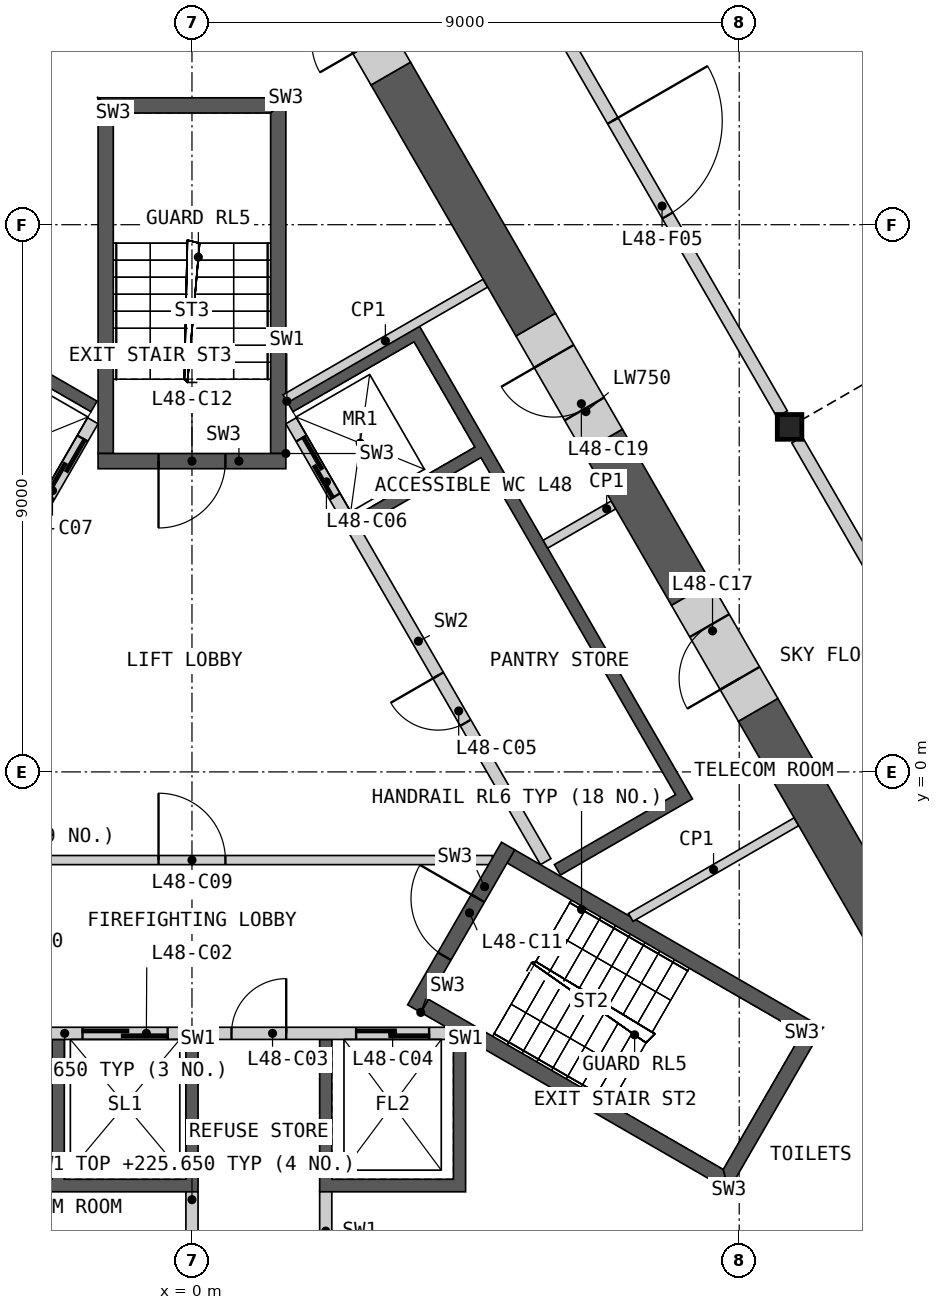
"""IFC4 building model, lengths in metres.
Left out: names, types, materials, properties, quantities, classifications, styles, units other than length and angle.
Written with IfcOpenShell. Run it as: python <this file> out.ifc"""

import sys

from ifc_helpers import new_model, si_unit, direction, frame, frame_2d, origin, origin_2d, place, context, subcontext, project, spatial, polyline, rectangle, i_section, outline, extrude, element, fill, save


model = new_model("IFC4")
c1 = context("Model", 3, precision=1e-05, world=origin(), true_north=direction((0.0, 1.0)))
c2 = subcontext(c1, "Body", "Model", "MODEL_VIEW")
j1 = project(units=[si_unit("LENGTHUNIT", "METRE"), si_unit("PLANEANGLEUNIT", "RADIAN")], contexts=[c1])
p1 = place(None, origin())
s1 = spatial("IfcSite", under=j1, at=p1, CompositionType="ELEMENT")
p2 = place(p1, origin())
s2 = spatial("IfcBuilding", under=s1, at=p2, CompositionType="ELEMENT")
p3 = place(p2, frame((0.0, 0.0, 216.0)))
s3 = spatial("IfcBuildingStorey", under=s2, at=p3, CompositionType="ELEMENT", Elevation=216.0)
p4 = place(p3, frame((9.828, 5.675, 0.0), z_axis=(0.0, 0.0, 1.0), x_axis=(1.0, 0.0, 0.0)))
e1 = element("IfcColumn", 1, at=p4, inside=s3, PredefinedType="COLUMN", context=c2, shape_type="SweptSolid", body=[
    extrude(i_section(OverallWidth=0.404, OverallDepth=0.407, WebThickness=0.027, FlangeThickness=0.044, at=origin_2d()), origin(), (0.0, 0.0, 1.0), 10.0),
])
p5 = place(p3, origin())
e2 = element("IfcWall", 2, at=p5, inside=s3, PredefinedType="SHEAR", context=c2, shape_type="SweptSolid", body=[
    extrude(outline(polyline([(4.5, -4.4), (4.5, -6.906), (2.1, -6.906), (2.1, -4.4), (2.3, -4.4), (2.3, -6.7), (4.3, -6.7), (4.3, -4.4), (4.5, -4.4)])), origin(), (0.0, 0.0, 1.0), 9.65),
])
p6 = place(p3, origin())
e3 = element("IfcWall", 3, at=p6, inside=s3, PredefinedType="SHEAR", context=c2, shape_type="SweptSolid", body=[
    extrude(outline(polyline([(0.1, -4.4), (0.1, -6.906), (-4.5, -6.906), (-4.5, -4.4), (-4.3, -4.4), (-4.3, -6.7), (-2.3, -6.7), (-2.3, -4.4), (-2.1, -4.4), (-2.1, -6.7), (-0.1, -6.7), (-0.1, -4.4), (0.1, -4.4)])), origin(), (0.0, 0.0, 1.0), 9.65),
])
p7 = place(p3, frame((-4.187, -4.3, 0.0), z_axis=(0.0, 0.0, 1.0), x_axis=(1.0, 0.0, 0.0)))
e4 = element("IfcWall", 4, at=p7, inside=s3, PredefinedType="SOLIDWALL", context=c2, shape_type="SweptSolid", body=[
    extrude(rectangle(XDim=8.373, YDim=0.2, at=frame_2d((4.187, 0.0))), origin(), (0.0, 0.0, 1.0), 9.65),
])
p8 = place(p7, frame((0.287, 0.0, 0.0)))
e5 = element("IfcOpeningElement", 5, at=p8, cuts=e4, PredefinedType="OPENING", context=c2, shape_type="SweptSolid", body=[
    extrude(rectangle(XDim=1.2, YDim=2.1, at=frame_2d((0.6, 1.05))), frame((0.0, 0.11, 0.0), z_axis=(0.0, -1.0, 0.0), x_axis=(1.0, 0.0, 0.0)), (0.0, 0.0, 1.0), 0.22),
])
p9 = place(p7, frame((2.387, 0.0, 0.0)))
e6 = element("IfcOpeningElement", 6, at=p9, cuts=e4, PredefinedType="OPENING", context=c2, shape_type="SweptSolid", body=[
    extrude(rectangle(XDim=1.4, YDim=2.1, at=frame_2d((0.7, 1.05))), frame((0.0, 0.11, 0.0), z_axis=(0.0, -1.0, 0.0), x_axis=(1.0, 0.0, 0.0)), (0.0, 0.0, 1.0), 0.22),
])
p10 = place(p7, frame((4.837, 0.0, 0.0)))
e7 = element("IfcOpeningElement", 7, at=p10, cuts=e4, PredefinedType="OPENING", context=c2, shape_type="SweptSolid", body=[
    extrude(rectangle(XDim=0.9, YDim=2.1, at=frame_2d((0.45, 1.05))), frame((0.0, 0.11, 0.0), z_axis=(0.0, -1.0, 0.0), x_axis=(1.0, 0.0, 0.0)), (0.0, 0.0, 1.0), 0.22),
])
p11 = place(p7, frame((6.887, 0.0, 0.0)))
e8 = element("IfcOpeningElement", 8, at=p11, cuts=e4, PredefinedType="OPENING", context=c2, shape_type="SweptSolid", body=[
    extrude(rectangle(XDim=1.2, YDim=2.1, at=frame_2d((0.6, 1.05))), frame((0.0, 0.11, 0.0), z_axis=(0.0, -1.0, 0.0), x_axis=(1.0, 0.0, 0.0)), (0.0, 0.0, 1.0), 0.22),
])
for number, where, z_axis, x_axis in (
    (9, (0.0, -6.906, 0.0), (0.0, 0.0, 1.0), (0.0, -1.0, 0.0)),
    (10, (2.2, -6.906, 0.0), (0.0, 0.0, 1.0), (0.0, -1.0, 0.0)),
):
    element("IfcWall", number, at=place(p3, frame(where, z_axis=z_axis, x_axis=x_axis)), inside=s3, PredefinedType="SHEAR", context=c2, shape_type="SweptSolid", body=[
        extrude(rectangle(XDim=1.293, YDim=0.2, at=frame_2d((0.646, 0.0))), origin(), (0.0, 0.0, 1.0), 9.65),
    ])
p12 = place(p3, origin())
e11 = element("IfcWall", 11, at=p12, inside=s3, PredefinedType="SHEAR", context=c2, shape_type="SweptSolid", body=[
    extrude(outline(polyline([(1.561, 6.097), (3.731, 7.35), (8.231, -0.444), (6.061, -1.697), (5.96, -1.524), (7.952, -0.374), (4.752, 5.169), (2.76, 4.019), (2.66, 4.192), (4.652, 5.342), (3.652, 7.074), (1.66, 5.924), (1.561, 6.097)])), origin(), (0.0, 0.0, 1.0), 9.65),
])
p13 = place(p3, frame((5.817, -1.476, 0.0), z_axis=(0.0, 0.0, 1.0), x_axis=(-0.500002616675, 0.866023893041, 0.0)))
e12 = element("IfcWall", 12, at=p13, inside=s3, PredefinedType="SOLIDWALL", context=c2, shape_type="SweptSolid", body=[
    extrude(rectangle(XDim=8.373, YDim=0.2, at=frame_2d((4.187, 0.0))), origin(), (0.0, 0.0, 1.0), 9.65),
])
p14 = place(p13, frame((2.637, 0.0, 0.0)))
e13 = element("IfcOpeningElement", 13, at=p14, cuts=e12, PredefinedType="OPENING", context=c2, shape_type="SweptSolid", body=[
    extrude(rectangle(XDim=0.9, YDim=2.1, at=frame_2d((0.45, 1.05))), frame((0.0, 0.11, 0.0), z_axis=(0.0, -1.0, 0.0), x_axis=(1.0, 0.0, 0.0)), (0.0, 0.0, 1.0), 0.22),
])
p15 = place(p13, frame((6.937, 0.0, 0.0)))
e14 = element("IfcOpeningElement", 14, at=p15, cuts=e12, PredefinedType="OPENING", context=c2, shape_type="SweptSolid", body=[
    extrude(rectangle(XDim=1.1, YDim=2.1, at=frame_2d((0.55, 1.05))), frame((0.0, 0.11, 0.0), z_axis=(0.0, -1.0, 0.0), x_axis=(1.0, 0.0, 0.0)), (0.0, 0.0, 1.0), 0.22),
])
p16 = place(p3, origin())
e15 = element("IfcWall", 15, at=p16, inside=s3, PredefinedType="SHEAR", context=c2, shape_type="SweptSolid", body=[
    extrude(outline(polyline([(-4.96, 0.208), (-7.131, 1.461), (-3.731, 7.35), (-1.561, 6.097), (-1.66, 5.924), (-3.652, 7.074), (-4.652, 5.342), (-2.66, 4.192), (-2.76, 4.019), (-4.752, 5.169), (-5.752, 3.437), (-3.76, 2.287), (-3.861, 2.113), (-5.852, 3.263), (-6.852, 1.531), (-4.861, 0.381), (-4.96, 0.208)])), origin(), (0.0, 0.0, 1.0), 9.65),
])
p17 = place(p3, frame((-1.631, 5.776, 0.0), z_axis=(0.0, 0.0, 1.0), x_axis=(-0.499992876559, -0.866029516466, 0.0)))
e16 = element("IfcWall", 16, at=p17, inside=s3, PredefinedType="SOLIDWALL", context=c2, shape_type="SweptSolid", body=[
    extrude(rectangle(XDim=6.486, YDim=0.2, at=frame_2d((3.243, 0.0))), origin(), (0.0, 0.0, 1.0), 9.65),
])
p18 = place(p17, frame((0.337, 0.0, 0.0)))
e17 = element("IfcOpeningElement", 17, at=p18, cuts=e16, PredefinedType="OPENING", context=c2, shape_type="SweptSolid", body=[
    extrude(rectangle(XDim=1.1, YDim=2.1, at=frame_2d((0.55, 1.05))), frame((0.0, 0.11, 0.0), z_axis=(0.0, -1.0, 0.0), x_axis=(1.0, 0.0, 0.0)), (0.0, 0.0, 1.0), 0.22),
])
p19 = place(p17, frame((2.537, 0.0, 0.0)))
e18 = element("IfcOpeningElement", 18, at=p19, cuts=e16, PredefinedType="OPENING", context=c2, shape_type="SweptSolid", body=[
    extrude(rectangle(XDim=1.1, YDim=2.1, at=frame_2d((0.55, 1.05))), frame((0.0, 0.11, 0.0), z_axis=(0.0, -1.0, 0.0), x_axis=(1.0, 0.0, 0.0)), (0.0, 0.0, 1.0), 0.22),
])
p20 = place(p3, frame((-4.941, -1.45, 0.0), z_axis=(0.0, 0.0, 1.0), x_axis=(1.0, 0.0, 0.0)))
e19 = element("IfcWall", 19, at=p20, inside=s3, PredefinedType="PARTITIONING", context=c2, shape_type="SweptSolid", body=[
    extrude(rectangle(XDim=9.882, YDim=0.15, at=frame_2d((4.941, 0.0))), origin(), (0.0, 0.0, 1.0), 9.65),
])
p21 = place(p20, frame((4.391, 0.0, 0.0)))
e20 = element("IfcOpeningElement", 20, at=p21, cuts=e19, PredefinedType="OPENING", context=c2, shape_type="SweptSolid", body=[
    extrude(rectangle(XDim=1.1, YDim=2.1, at=frame_2d((0.55, 1.05))), frame((0.0, 0.085, 0.0), z_axis=(0.0, -1.0, 0.0), x_axis=(1.0, 0.0, 0.0)), (0.0, 0.0, 1.0), 0.17),
])
p22 = place(p3, origin())
e21 = element("IfcWall", 21, at=p22, inside=s3, PredefinedType="SHEAR", context=c2, shape_type="SweptSolid", body=[
    extrude(outline(polyline([(3.763, -3.956), (8.83, -6.881), (8.738, -6.539), (3.888, -3.739), (3.763, -3.956)])), origin(), (0.0, 0.0, 1.0), 9.65),
])
p23 = place(p3, origin())
e22 = element("IfcWall", 22, at=p23, inside=s3, PredefinedType="SHEAR", context=c2, shape_type="SweptSolid", body=[
    extrude(outline(polyline([(8.83, -6.881), (10.374, -4.206), (10.032, -4.298), (8.738, -6.539), (8.83, -6.881)])), origin(), (0.0, 0.0, 1.0), 9.65),
])
p24 = place(p3, origin())
e23 = element("IfcWall", 23, at=p24, inside=s3, PredefinedType="SHEAR", context=c2, shape_type="SweptSolid", body=[
    extrude(outline(polyline([(10.032, -4.298), (10.374, -4.206), (5.307, -1.281), (5.182, -1.498), (10.032, -4.298)])), origin(), (0.0, 0.0, 1.0), 9.65),
])
p25 = place(p3, frame((3.655, -3.893, 0.0), z_axis=(0.0, 0.0, 1.0), x_axis=(0.499982516597, 0.866035497597, 0.0)))
e24 = element("IfcWall", 24, at=p25, inside=s3, PredefinedType="SHEAR", context=c2, shape_type="SweptSolid", body=[
    extrude(rectangle(XDim=3.088, YDim=0.25, at=frame_2d((1.544, 0.0))), origin(), (0.0, 0.0, 1.0), 9.65),
])
p26 = place(p25, frame((0.994, 0.0, 0.0)))
e25 = element("IfcOpeningElement", 25, at=p26, cuts=e24, PredefinedType="OPENING", context=c2, shape_type="SweptSolid", body=[
    extrude(rectangle(XDim=1.1, YDim=2.1, at=frame_2d((0.55, 1.05))), frame((0.0, 0.135, 0.0), z_axis=(0.0, -1.0, 0.0), x_axis=(1.0, 0.0, 0.0)), (0.0, 0.0, 1.0), 0.27),
])
p27 = place(p3, origin())
e26 = element("IfcWall", 26, at=p27, inside=s3, PredefinedType="SHEAR", context=c2, shape_type="SweptSolid", body=[
    extrude(outline(polyline([(1.544, 5.237), (1.544, 11.087), (1.294, 10.837), (1.294, 5.237), (1.544, 5.237)])), origin(), (0.0, 0.0, 1.0), 9.65),
])
p28 = place(p3, origin())
e27 = element("IfcWall", 27, at=p28, inside=s3, PredefinedType="SHEAR", context=c2, shape_type="SweptSolid", body=[
    extrude(outline(polyline([(1.544, 11.087), (-1.544, 11.087), (-1.294, 10.837), (1.294, 10.837), (1.544, 11.087)])), origin(), (0.0, 0.0, 1.0), 9.65),
])
p29 = place(p3, origin())
e28 = element("IfcWall", 28, at=p29, inside=s3, PredefinedType="SHEAR", context=c2, shape_type="SweptSolid", body=[
    extrude(outline(polyline([(-1.294, 10.837), (-1.544, 11.087), (-1.544, 5.237), (-1.294, 5.237), (-1.294, 10.837)])), origin(), (0.0, 0.0, 1.0), 9.65),
])
p30 = place(p3, frame((1.544, 5.112, 0.0), z_axis=(0.0, 0.0, 1.0), x_axis=(-1.0, 0.0, 0.0)))
e29 = element("IfcWall", 29, at=p30, inside=s3, PredefinedType="SHEAR", context=c2, shape_type="SweptSolid", body=[
    extrude(rectangle(XDim=3.088, YDim=0.25, at=frame_2d((1.544, 0.0))), origin(), (0.0, 0.0, 1.0), 9.65),
])
p31 = place(p30, frame((0.994, 0.0, 0.0)))
e30 = element("IfcOpeningElement", 30, at=p31, cuts=e29, PredefinedType="OPENING", context=c2, shape_type="SweptSolid", body=[
    extrude(rectangle(XDim=1.1, YDim=2.1, at=frame_2d((0.55, 1.05))), frame((0.0, 0.135, 0.0), z_axis=(0.0, -1.0, 0.0), x_axis=(1.0, 0.0, 0.0)), (0.0, 0.0, 1.0), 0.27),
])
p32 = place(p3, frame((9.941, -0.82, 0.0), z_axis=(0.0, 0.0, 1.0), x_axis=(-0.866018897435, -0.500011269158, 0.0)))
e31 = element("IfcWall", 31, at=p32, inside=s3, PredefinedType="PARTITIONING", context=c2, shape_type="SweptSolid", body=[
    extrude(rectangle(XDim=3.146, YDim=0.15, at=frame_2d((1.573, 0.0))), origin(), (0.0, 0.0, 1.0), 9.65),
])
p33 = place(p3, frame((6.932, 4.391, 0.0), z_axis=(0.0, 0.0, 1.0), x_axis=(-0.866003189247, -0.500038474733, 0.0)))
e32 = element("IfcWall", 32, at=p33, inside=s3, PredefinedType="PARTITIONING", context=c2, shape_type="SweptSolid", body=[
    extrude(rectangle(XDim=1.293, YDim=0.15, at=frame_2d((0.646, 0.0))), origin(), (0.0, 0.0, 1.0), 9.65),
])
p34 = place(p3, frame((4.826, 8.039, 0.0), z_axis=(0.0, 0.0, 1.0), x_axis=(-0.86601654697, -0.500015340139, 0.0)))
e33 = element("IfcWall", 33, at=p34, inside=s3, PredefinedType="PARTITIONING", context=c2, shape_type="SweptSolid", body=[
    extrude(rectangle(XDim=3.8, YDim=0.15, at=frame_2d((1.9, 0.0))), origin(), (0.0, 0.0, 1.0), 9.65),
])
p35 = place(p3, frame((14.526, -8.011, 0.0), z_axis=(0.0, 0.0, 1.0), x_axis=(-0.499981157383, 0.866036282301, 0.0)))
e34 = element("IfcWall", 34, at=p35, inside=s3, PredefinedType="SHEAR", context=c2, shape_type="SweptSolid", body=[
    extrude(rectangle(XDim=10.429, YDim=0.75, at=frame_2d((5.215, 0.0))), origin(), (0.0, 0.0, 1.0), 9.65),
])
p36 = place(p3, frame((5.654, 7.355, 0.0), z_axis=(0.0, 0.0, 1.0), x_axis=(-0.4999705729, 0.866042392862, 0.0)))
e35 = element("IfcWall", 35, at=p36, inside=s3, PredefinedType="SHEAR", context=c2, shape_type="SweptSolid", body=[
    extrude(rectangle(XDim=4.77, YDim=0.75, at=frame_2d((2.385, 0.0))), origin(), (0.0, 0.0, 1.0), 9.65),
])
p37 = place(p3, frame((8.211, 2.926, 0.0), z_axis=(0.0, 0.0, 1.0), x_axis=(-0.500022172694, 0.866012601995, 0.0)))
e36 = element("IfcWall", 36, at=p37, inside=s3, PredefinedType="SHEAR", context=c2, shape_type="SweptSolid", body=[
    extrude(rectangle(XDim=2.914, YDim=0.75, at=frame_2d((1.457, 0.0))), origin(), (0.0, 0.0, 1.0), 9.65),
])
p38 = place(p3, frame((-0.325, 16.585, 0.0), z_axis=(0.0, 0.0, 1.0), x_axis=(-0.500008939514, -0.866020242492, 0.0)))
e37 = element("IfcWall", 37, at=p38, inside=s3, PredefinedType="SHEAR", context=c2, shape_type="SweptSolid", body=[
    extrude(rectangle(XDim=11.901, YDim=0.75, at=frame_2d((5.951, 0.0))), origin(), (0.0, 0.0, 1.0), 9.65),
])
p39 = place(p3, frame((9.311, 1.021, 0.0), z_axis=(0.0, 0.0, 1.0), x_axis=(-0.50002983664, 0.866008176907, 0.0)))
e38 = element("IfcWall", 38, at=p39, inside=s3, PredefinedType="SHEAR", context=c2, shape_type="SweptSolid", body=[
    extrude(rectangle(XDim=2.2, YDim=0.75, at=frame_2d((1.1, 0.0))), origin(), (0.0, 0.0, 1.0), 9.65),
])
p40 = place(p39, frame((0.6, 0.0, 0.0)))
e39 = element("IfcOpeningElement", 39, at=p40, cuts=e38, PredefinedType="OPENING", context=c2, shape_type="SweptSolid", body=[
    extrude(rectangle(XDim=1.0, YDim=2.1, at=frame_2d((0.5, 1.05))), frame((0.0, 0.385, 0.0), z_axis=(0.0, -1.0, 0.0), x_axis=(1.0, 0.0, 0.0)), (0.0, 0.0, 1.0), 0.77),
])
p41 = place(p3, frame((6.754, 5.45, 0.0), z_axis=(0.0, 0.0, 1.0), x_axis=(-0.499994660107, 0.866028486751, 0.0)))
e40 = element("IfcWall", 40, at=p41, inside=s3, PredefinedType="SHEAR", context=c2, shape_type="SweptSolid", body=[
    extrude(rectangle(XDim=2.2, YDim=0.75, at=frame_2d((1.1, 0.0))), origin(), (0.0, 0.0, 1.0), 9.65),
])
p42 = place(p41, frame((0.6, 0.0, 0.0)))
e41 = element("IfcOpeningElement", 41, at=p42, cuts=e40, PredefinedType="OPENING", context=c2, shape_type="SweptSolid", body=[
    extrude(rectangle(XDim=1.0, YDim=2.1, at=frame_2d((0.5, 1.05))), frame((0.0, 0.385, 0.0), z_axis=(0.0, -1.0, 0.0), x_axis=(1.0, 0.0, 0.0)), (0.0, 0.0, 1.0), 0.77),
])
p43 = place(p3, frame((3.269, 11.486, 0.0), z_axis=(0.0, 0.0, 1.0), x_axis=(-0.50002983664, 0.866008176907, 0.0)))
e42 = element("IfcWall", 42, at=p43, inside=s3, PredefinedType="SHEAR", context=c2, shape_type="SweptSolid", body=[
    extrude(rectangle(XDim=2.2, YDim=0.75, at=frame_2d((1.1, 0.0))), origin(), (0.0, 0.0, 1.0), 9.65),
])
p44 = place(p43, frame((0.6, 0.0, 0.0)))
e43 = element("IfcOpeningElement", 43, at=p44, cuts=e42, PredefinedType="OPENING", context=c2, shape_type="SweptSolid", body=[
    extrude(rectangle(XDim=1.0, YDim=2.1, at=frame_2d((0.5, 1.05))), frame((0.0, 0.385, 0.0), z_axis=(0.0, -1.0, 0.0), x_axis=(1.0, 0.0, 0.0)), (0.0, 0.0, 1.0), 0.77),
])
p45 = place(p3, frame((5.038, 13.972, 0.0), z_axis=(0.0, 0.0, 1.0), x_axis=(0.50000393355, -0.866023132736, 0.0)))
e44 = element("IfcWall", 44, at=p45, inside=s3, PredefinedType="PARTITIONING", context=c2, shape_type="SweptSolid", body=[
    extrude(rectangle(XDim=9.335, YDim=0.2, at=frame_2d((4.667, 0.0))), origin(), (0.0, 0.0, 1.0), 9.65),
])
p46 = place(p45, frame((3.768, 0.0, 0.0)))
e45 = element("IfcOpeningElement", 45, at=p46, cuts=e44, PredefinedType="OPENING", context=c2, shape_type="SweptSolid", body=[
    extrude(rectangle(XDim=1.8, YDim=2.1, at=frame_2d((0.9, 1.05))), frame((0.0, 0.11, 0.0), z_axis=(0.0, -1.0, 0.0), x_axis=(1.0, 0.0, 0.0)), (0.0, 0.0, 1.0), 0.22),
])
p47 = place(p3, frame((9.952, 5.461, 0.0), z_axis=(0.0, 0.0, 1.0), x_axis=(0.50000393355, -0.866023132736, 0.0)))
e46 = element("IfcWall", 46, at=p47, inside=s3, PredefinedType="PARTITIONING", context=c2, shape_type="SweptSolid", body=[
    extrude(rectangle(XDim=9.335, YDim=0.2, at=frame_2d((4.667, 0.0))), origin(), (0.0, 0.0, 1.0), 9.65),
])
p48 = place(p9, origin())
e47 = element("IfcDoor", 47, at=p48, inside=s3, OperationType="SLIDING_TO_LEFT", PredefinedType="DOOR", context=c2, shape_type="SweptSolid", body=[
    extrude(rectangle(XDim=1.4, YDim=2.1, at=frame_2d((0.7, 1.05))), frame((0.0, 0.025, 0.0), z_axis=(0.0, -1.0, 0.0), x_axis=(1.0, 0.0, 0.0)), (0.0, 0.0, 1.0), 0.05),
])
fill(e6, e47)
p49 = place(p10, origin())
e48 = element("IfcDoor", 48, at=p49, inside=s3, OperationType="SINGLE_SWING_RIGHT", PredefinedType="DOOR", context=c2, shape_type="SweptSolid", body=[
    extrude(rectangle(XDim=0.9, YDim=2.1, at=frame_2d((0.45, 1.05))), frame((0.0, 0.025, 0.0), z_axis=(0.0, -1.0, 0.0), x_axis=(1.0, 0.0, 0.0)), (0.0, 0.0, 1.0), 0.05),
])
fill(e7, e48)
p50 = place(p11, origin())
e49 = element("IfcDoor", 49, at=p50, inside=s3, OperationType="SLIDING_TO_LEFT", PredefinedType="DOOR", context=c2, shape_type="SweptSolid", body=[
    extrude(rectangle(XDim=1.2, YDim=2.1, at=frame_2d((0.6, 1.05))), frame((0.0, 0.025, 0.0), z_axis=(0.0, -1.0, 0.0), x_axis=(1.0, 0.0, 0.0)), (0.0, 0.0, 1.0), 0.05),
])
fill(e8, e49)
p51 = place(p14, origin())
e50 = element("IfcDoor", 50, at=p51, inside=s3, OperationType="SINGLE_SWING_RIGHT", PredefinedType="DOOR", context=c2, shape_type="SweptSolid", body=[
    extrude(rectangle(XDim=0.9, YDim=2.1, at=frame_2d((0.45, 1.05))), frame((0.0, 0.025, 0.0), z_axis=(0.0, -1.0, 0.0), x_axis=(1.0, 0.0, 0.0)), (0.0, 0.0, 1.0), 0.05),
])
fill(e13, e50)
p52 = place(p15, origin())
e51 = element("IfcDoor", 51, at=p52, inside=s3, OperationType="SLIDING_TO_LEFT", PredefinedType="DOOR", context=c2, shape_type="SweptSolid", body=[
    extrude(rectangle(XDim=1.1, YDim=2.1, at=frame_2d((0.55, 1.05))), frame((0.0, 0.025, 0.0), z_axis=(0.0, -1.0, 0.0), x_axis=(1.0, 0.0, 0.0)), (0.0, 0.0, 1.0), 0.05),
])
fill(e14, e51)
p53 = place(p18, origin())
e52 = element("IfcDoor", 52, at=p53, inside=s3, OperationType="SLIDING_TO_LEFT", PredefinedType="DOOR", context=c2, shape_type="SweptSolid", body=[
    extrude(rectangle(XDim=1.1, YDim=2.1, at=frame_2d((0.55, 1.05))), frame((0.0, 0.025, 0.0), z_axis=(0.0, -1.0, 0.0), x_axis=(1.0, 0.0, 0.0)), (0.0, 0.0, 1.0), 0.05),
])
fill(e17, e52)
p54 = place(p21, origin())
e53 = element("IfcDoor", 53, at=p54, inside=s3, OperationType="SINGLE_SWING_LEFT", PredefinedType="DOOR", context=c2, shape_type="SweptSolid", body=[
    extrude(rectangle(XDim=1.1, YDim=2.1, at=frame_2d((0.55, 1.05))), frame((0.0, 0.025, 0.0), z_axis=(0.0, -1.0, 0.0), x_axis=(1.0, 0.0, 0.0)), (0.0, 0.0, 1.0), 0.05),
])
fill(e20, e53)
p55 = place(p26, origin())
e54 = element("IfcDoor", 54, at=p55, inside=s3, OperationType="SINGLE_SWING_RIGHT", PredefinedType="DOOR", context=c2, shape_type="SweptSolid", body=[
    extrude(rectangle(XDim=1.1, YDim=2.1, at=frame_2d((0.55, 1.05))), frame((0.0, 0.025, 0.0), z_axis=(0.0, -1.0, 0.0), x_axis=(1.0, 0.0, 0.0)), (0.0, 0.0, 1.0), 0.05),
])
fill(e25, e54)
p56 = place(p31, origin())
e55 = element("IfcDoor", 55, at=p56, inside=s3, OperationType="SINGLE_SWING_RIGHT", PredefinedType="DOOR", context=c2, shape_type="SweptSolid", body=[
    extrude(rectangle(XDim=1.1, YDim=2.1, at=frame_2d((0.55, 1.05))), frame((0.0, 0.025, 0.0), z_axis=(0.0, -1.0, 0.0), x_axis=(1.0, 0.0, 0.0)), (0.0, 0.0, 1.0), 0.05),
])
fill(e30, e55)
p57 = place(p40, origin())
e56 = element("IfcDoor", 56, at=p57, inside=s3, OperationType="SINGLE_SWING_LEFT", PredefinedType="DOOR", context=c2, shape_type="SweptSolid", body=[
    extrude(rectangle(XDim=1.0, YDim=2.1, at=frame_2d((0.5, 1.05))), frame((0.0, 0.13, 0.0), z_axis=(0.0, -1.0, 0.0), x_axis=(1.0, 0.0, 0.0)), (0.0, 0.0, 1.0), 0.05),
])
fill(e39, e56)
p58 = place(p42, origin())
e57 = element("IfcDoor", 57, at=p58, inside=s3, OperationType="SINGLE_SWING_RIGHT", PredefinedType="DOOR", context=c2, shape_type="SweptSolid", body=[
    extrude(rectangle(XDim=1.0, YDim=2.1, at=frame_2d((0.5, 1.05))), frame((0.0, 0.13, 0.0), z_axis=(0.0, -1.0, 0.0), x_axis=(1.0, 0.0, 0.0)), (0.0, 0.0, 1.0), 0.05),
])
fill(e41, e57)
p59 = place(p46, origin())
e58 = element("IfcDoor", 58, at=p59, inside=s3, OperationType="DOUBLE_DOOR_SINGLE_SWING", PredefinedType="DOOR", context=c2, shape_type="SweptSolid", body=[
    extrude(rectangle(XDim=1.8, YDim=2.1, at=frame_2d((0.9, 1.05))), frame((0.0, 0.025, 0.0), z_axis=(0.0, -1.0, 0.0), x_axis=(1.0, 0.0, 0.0)), (0.0, 0.0, 1.0), 0.05),
])
fill(e45, e58)
save(model, sys.argv[1])
